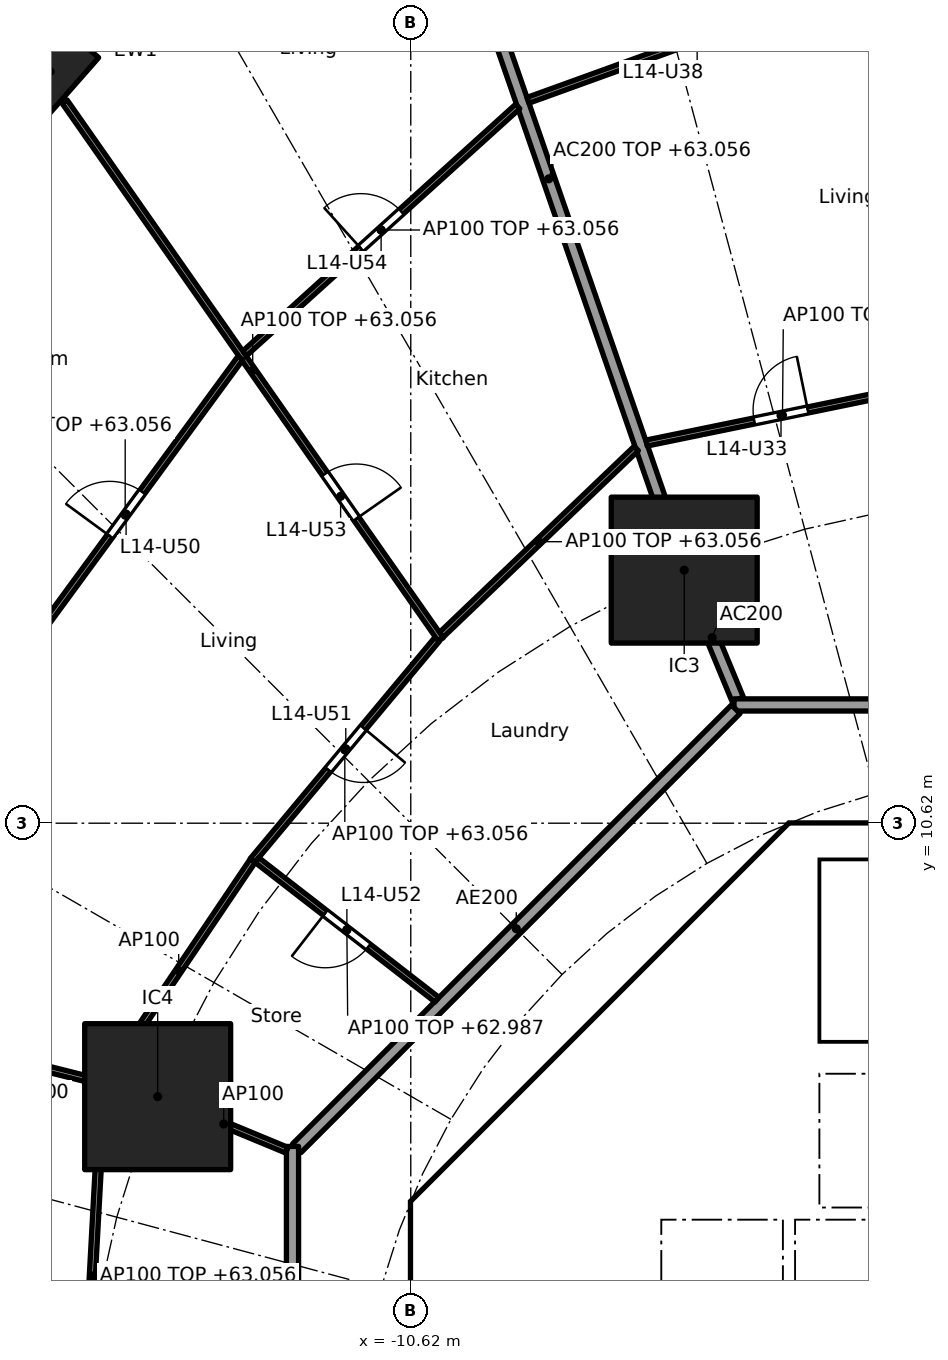
"""IFC4 building model, lengths in metres.
Left out: names, types, materials, properties, quantities, classifications, styles, units other than length and angle.
Written with IfcOpenShell. Run it as: python <this file> out.ifc"""

import sys

from ifc_helpers import new_model, si_unit, direction, frame, frame_2d, origin, origin_2d, place, context, subcontext, project, spatial, polyline, rectangle, hollow_rectangle, outline, extrude, element, fill, save


model = new_model("IFC4")
c1 = context("Model", 3, precision=1e-05, world=origin(), true_north=direction((0.0, 1.0)))
c2 = subcontext(c1, "Body", "Model", "MODEL_VIEW")
j1 = project(units=[si_unit("LENGTHUNIT", "METRE"), si_unit("PLANEANGLEUNIT", "RADIAN")], contexts=[c1])
p1 = place(None, origin())
s1 = spatial("IfcSite", under=j1, at=p1, CompositionType="ELEMENT")
p2 = place(p1, origin())
s2 = spatial("IfcBuilding", under=s1, at=p2, CompositionType="ELEMENT")
p3 = place(p2, frame((0.0, 0.0, 60.3)))
s3 = spatial("IfcBuildingStorey", under=s2, at=p3, CompositionType="ELEMENT", Elevation=60.3)
p4 = place(p3, frame((-16.552, 22.981, 0.0), z_axis=(0.0, 0.0, 1.0), x_axis=(-0.660114607735, -0.751164898445, 0.0)))
e1 = element("IfcColumn", 1, at=p4, inside=s3, PredefinedType="COLUMN", context=c2, shape_type="SweptSolid", body=[
    extrude(hollow_rectangle(XDim=1.4, YDim=0.9, WallThickness=0.05, at=origin_2d()), origin(), (0.0, 0.0, 1.0), 3.7),
])
for number, where, z_axis, x_axis in (
    (2, (-6.123, 14.782, 0.0), (0.0, 0.0, 1.0), (1.0, 0.0, 0.0)),
    (3, (-14.782, 6.123, 0.0), (0.0, 0.0, 1.0), (1.0, 0.0, 0.0)),
):
    element("IfcColumn", number, at=place(p3, frame(where, z_axis=z_axis, x_axis=x_axis)), inside=s3, PredefinedType="COLUMN", context=c2, shape_type="SweptSolid", body=[
        extrude(rectangle(XDim=2.4, YDim=2.4, at=origin_2d()), origin(), (0.0, 0.0, 1.0), 3.7),
    ])
p5 = place(p3, frame((-4.613, 9.988, 0.0), z_axis=(0.0, 0.0, 1.0), x_axis=(-0.707106781187, -0.707106781187, 0.0)))
e4 = element("IfcWall", 4, at=p5, inside=s3, PredefinedType="SHEAR", context=c2, shape_type="SweptSolid", body=[
    extrude(rectangle(XDim=7.602, YDim=0.6, at=frame_2d((3.801, 0.0))), origin(), (0.0, 0.0, 1.0), 3.44),
])
p6 = place(p5, frame((0.351, 0.0, 0.0)))
e5 = element("IfcOpeningElement", 5, at=p6, cuts=e4, PredefinedType="OPENING", context=c2, shape_type="SweptSolid", body=[
    extrude(rectangle(XDim=1.1, YDim=2.1, at=frame_2d((0.55, 1.05))), frame((0.0, 0.31, 0.0), z_axis=(0.0, -1.0, 0.0), x_axis=(1.0, 0.0, 0.0)), (0.0, 0.0, 1.0), 0.62),
])
p7 = place(p3, frame((-10.325, 3.801, 0.0), z_axis=(0.0, 0.0, 1.0), x_axis=(0.0, -1.0, 0.0)))
e6 = element("IfcWall", 6, at=p7, inside=s3, PredefinedType="SHEAR", context=c2, shape_type="SweptSolid", body=[
    extrude(rectangle(XDim=7.602, YDim=0.6, at=frame_2d((3.801, 0.0))), origin(), (0.0, 0.0, 1.0), 3.44),
])
p8 = place(p7, frame((0.651, 0.0, 0.0)))
e7 = element("IfcOpeningElement", 7, at=p8, cuts=e6, PredefinedType="OPENING", context=c2, shape_type="SweptSolid", body=[
    extrude(rectangle(XDim=1.5, YDim=2.1, at=frame_2d((0.75, 1.05))), frame((0.0, 0.31, 0.0), z_axis=(0.0, -1.0, 0.0), x_axis=(1.0, 0.0, 0.0)), (0.0, 0.0, 1.0), 0.62),
])
p9 = place(p7, frame((5.451, 0.0, 0.0)))
e8 = element("IfcOpeningElement", 8, at=p9, cuts=e6, PredefinedType="OPENING", context=c2, shape_type="SweptSolid", body=[
    extrude(rectangle(XDim=1.5, YDim=2.1, at=frame_2d((0.75, 1.05))), frame((0.0, 0.31, 0.0), z_axis=(0.0, -1.0, 0.0), x_axis=(1.0, 0.0, 0.0)), (0.0, 0.0, 1.0), 0.62),
])
p10 = place(p3, frame((-5.8, 4.3, 0.0), z_axis=(0.0, 0.0, 1.0), x_axis=(0.0, 1.0, 0.0)))
e9 = element("IfcWall", 9, at=p10, inside=s3, PredefinedType="PARTITIONING", context=c2, shape_type="SweptSolid", body=[
    extrude(rectangle(XDim=3.927, YDim=0.15, at=frame_2d((1.963, 0.0))), origin(), (0.0, 0.0, 1.0), 3.44),
])
p11 = place(p10, frame((0.413, 0.0, 0.0)))
e10 = element("IfcOpeningElement", 10, at=p11, cuts=e9, PredefinedType="OPENING", context=c2, shape_type="SweptSolid", body=[
    extrude(rectangle(XDim=0.9, YDim=2.1, at=frame_2d((0.45, 1.05))), frame((0.0, 0.085, 0.0), z_axis=(0.0, -1.0, 0.0), x_axis=(1.0, 0.0, 0.0)), (0.0, 0.0, 1.0), 0.17),
])
p12 = place(p10, frame((2.489, 0.0, 0.0)))
e11 = element("IfcOpeningElement", 11, at=p12, cuts=e9, PredefinedType="OPENING", context=c2, shape_type="SweptSolid", body=[
    extrude(rectangle(XDim=0.9, YDim=2.1, at=frame_2d((0.45, 1.05))), frame((0.0, 0.085, 0.0), z_axis=(0.0, -1.0, 0.0), x_axis=(1.0, 0.0, 0.0)), (0.0, 0.0, 1.0), 0.17),
])
p13 = place(p3, frame((-4.0, 4.3, 0.0), z_axis=(0.0, 0.0, 1.0), x_axis=(0.0, 1.0, 0.0)))
e12 = element("IfcWall", 12, at=p13, inside=s3, PredefinedType="SOLIDWALL", context=c2, shape_type="SweptSolid", body=[
    extrude(rectangle(XDim=2.2, YDim=0.2, at=frame_2d((1.1, 0.0))), origin(), (0.0, 0.0, 1.0), 3.44),
])
p14 = place(p13, frame((0.55, 0.0, 0.0)))
e13 = element("IfcOpeningElement", 13, at=p14, cuts=e12, PredefinedType="OPENING", context=c2, shape_type="SweptSolid", body=[
    extrude(rectangle(XDim=1.1, YDim=2.1, at=frame_2d((0.55, 1.05))), frame((0.0, 0.11, 0.0), z_axis=(0.0, -1.0, 0.0), x_axis=(1.0, 0.0, 0.0)), (0.0, 0.0, 1.0), 0.22),
])
p15 = place(p3, origin())
e14 = element("IfcWall", 14, at=p15, inside=s3, PredefinedType="SHEAR", context=c2, shape_type="SweptSolid", body=[
    extrude(outline(polyline([(-10.2, 4.825), (-9.776, 4.401), (-10.025, 4.152), (-10.025, 3.801), (-10.625, 3.801), (-10.625, 4.401), (-10.2, 4.825)])), origin(), (0.0, 0.0, 1.0), 3.44),
])
p16 = place(p3, origin())
e15 = element("IfcWall", 15, at=p16, inside=s3, PredefinedType="SHEAR", context=c2, shape_type="SweptSolid", body=[
    extrude(outline(polyline([(-4.152, 10.025), (-4.401, 9.776), (-4.825, 10.2), (-4.401, 10.625), (4.401, 10.625), (4.825, 10.2), (4.401, 9.776), (4.152, 10.025), (-4.152, 10.025)])), origin(), (0.0, 0.0, 1.0), 3.44),
])
p17 = place(p3, frame((-10.025, 4.0, 0.0), z_axis=(0.0, 0.0, 1.0), x_axis=(1.0, 0.0, 0.0)))
e16 = element("IfcWall", 16, at=p17, inside=s3, PredefinedType="PARTITIONING", context=c2, shape_type="SweptSolid", body=[
    extrude(rectangle(XDim=3.325, YDim=0.2, at=frame_2d((1.662, 0.0))), origin(), (0.0, 0.0, 1.0), 3.44),
])
p18 = place(p3, frame((-8.001, 6.1, 0.0), z_axis=(0.0, 0.0, 1.0), x_axis=(1.0, 0.0, 0.0)))
e17 = element("IfcWall", 17, at=p18, inside=s3, PredefinedType="PARTITIONING", context=c2, shape_type="SweptSolid", body=[
    extrude(rectangle(XDim=2.126, YDim=0.15, at=frame_2d((1.063, 0.0))), origin(), (0.0, 0.0, 1.0), 3.44),
])
p19 = place(p3, origin())
e18 = element("IfcWall", 18, at=p19, inside=s3, PredefinedType="SOLIDWALL", context=c2, shape_type="SweptSolid", body=[
    extrude(outline(polyline([(-6.5, 2.1), (-6.7, 2.1), (-6.7, 4.3), (6.7, 4.3), (6.7, 2.1), (6.5, 2.1), (6.5, 4.1), (4.5, 4.1), (4.5, 2.1), (4.3, 2.1), (4.3, 4.1), (2.3, 4.1), (2.3, 2.1), (2.1, 2.1), (2.1, 4.1), (0.1, 4.1), (0.1, 2.1), (-0.1, 2.1), (-0.1, 4.1), (-2.1, 4.1), (-2.1, 2.1), (-2.3, 2.1), (-2.3, 4.1), (-4.3, 4.1), (-4.3, 2.1), (-4.5, 2.1), (-4.5, 4.1), (-6.5, 4.1), (-6.5, 2.1)])), origin(), (0.0, 0.0, 1.0), 3.44),
])
p20 = place(p3, origin())
e19 = element("IfcWall", 19, at=p20, inside=s3, PredefinedType="SOLIDWALL", context=c2, shape_type="SweptSolid", body=[
    extrude(outline(polyline([(-3.9, 7.025), (-4.1, 7.025), (-4.1, 10.025), (-3.9, 10.025), (-3.9, 7.025)])), origin(), (0.0, 0.0, 1.0), 3.44),
])
p21 = place(p3, origin())
e20 = element("IfcWall", 20, at=p21, inside=s3, PredefinedType="SOLIDWALL", context=c2, shape_type="SweptSolid", body=[
    extrude(outline(polyline([(4.1, 6.5), (-4.1, 6.5), (-4.1, 7.025), (4.1, 7.025), (4.1, 6.5)])), origin(), (0.0, 0.0, 1.0), 3.44),
])
p22 = place(p3, frame((-5.243, 12.657, 0.0), z_axis=(0.0, 0.0, 1.0), x_axis=(-0.382668627144, 0.923885664896, 0.0)))
e21 = element("IfcWall", 21, at=p22, inside=s3, PredefinedType="PARTITIONING", context=c2, shape_type="SweptSolid", body=[
    extrude(rectangle(XDim=2.2, YDim=0.2, at=frame_2d((1.1, 0.0))), origin(), (0.0, 0.0, 1.0), 3.44),
])
p23 = place(p3, frame((-6.139, 14.829, 0.0), z_axis=(0.0, 0.0, 1.0), x_axis=(-0.327178799566, 0.944962450637, 0.0)))
e22 = element("IfcWall", 22, at=p23, inside=s3, PredefinedType="PARTITIONING", context=c2, shape_type="SweptSolid", body=[
    extrude(rectangle(XDim=13.517, YDim=0.2, at=frame_2d((6.759, 0.0))), origin(), (0.0, 0.0, 1.0), 2.756),
])
p24 = place(p3, frame((5.104, 12.565, 0.0), z_axis=(0.0, 0.0, 1.0), x_axis=(-1.0, 0.0, 0.0)))
e23 = element("IfcWall", 23, at=p24, inside=s3, PredefinedType="PARTITIONING", context=c2, shape_type="SweptSolid", body=[
    extrude(rectangle(XDim=10.409, YDim=0.2, at=frame_2d((5.205, 0.0))), origin(), (0.0, 0.0, 1.0), 3.44),
])
p25 = place(p24, frame((1.185, 0.0, 0.0)))
e24 = element("IfcOpeningElement", 24, at=p25, cuts=e23, PredefinedType="OPENING", context=c2, shape_type="SweptSolid", body=[
    extrude(rectangle(XDim=1.0, YDim=2.1, at=frame_2d((0.5, 1.05))), frame((0.0, 0.11, 0.0), z_axis=(0.0, -1.0, 0.0), x_axis=(1.0, 0.0, 0.0)), (0.0, 0.0, 1.0), 0.22),
])
p26 = place(p3, frame((-5.275, 12.494, 0.0), z_axis=(0.0, 0.0, 1.0), x_axis=(-0.707106781187, -0.707106781187, 0.0)))
e25 = element("IfcWall", 25, at=p26, inside=s3, PredefinedType="PARTITIONING", context=c2, shape_type="SweptSolid", body=[
    extrude(rectangle(XDim=10.209, YDim=0.2, at=frame_2d((5.104, 0.0))), origin(), (0.0, 0.0, 1.0), 3.44),
])
p27 = place(p3, frame((-12.565, 5.304, 0.0), z_axis=(0.0, 0.0, 1.0), x_axis=(0.0, -1.0, 0.0)))
e26 = element("IfcWall", 26, at=p27, inside=s3, PredefinedType="PARTITIONING", context=c2, shape_type="SweptSolid", body=[
    extrude(rectangle(XDim=10.409, YDim=0.2, at=frame_2d((5.205, 0.0))), origin(), (0.0, 0.0, 1.0), 3.44),
])
p28 = place(p27, frame((6.106, 0.0, 0.0)))
e27 = element("IfcOpeningElement", 27, at=p28, cuts=e26, PredefinedType="OPENING", context=c2, shape_type="SweptSolid", body=[
    extrude(rectangle(XDim=1.0, YDim=2.1, at=frame_2d((0.5, 1.05))), frame((0.0, 0.11, 0.0), z_axis=(0.0, -1.0, 0.0), x_axis=(1.0, 0.0, 0.0)), (0.0, 0.0, 1.0), 0.22),
])
p29 = place(p3, frame((-2.272, 17.789, 0.0), z_axis=(0.0, 0.0, 1.0), x_axis=(-0.979595137747, -0.200981009307, 0.0)))
e28 = element("IfcWall", 28, at=p29, inside=s3, PredefinedType="PARTITIONING", context=c2, shape_type="SweptSolid", body=[
    extrude(rectangle(XDim=4.562, YDim=0.1, at=frame_2d((2.281, 0.0))), origin(), (0.0, 0.0, 1.0), 2.756),
])
p30 = place(p29, frame((1.856, 0.0, 0.0)))
e29 = element("IfcOpeningElement", 29, at=p30, cuts=e28, PredefinedType="OPENING", context=c2, shape_type="SweptSolid", body=[
    extrude(rectangle(XDim=0.9, YDim=2.1, at=frame_2d((0.45, 1.05))), frame((0.0, 0.06, 0.0), z_axis=(0.0, -1.0, 0.0), x_axis=(1.0, 0.0, 0.0)), (0.0, 0.0, 1.0), 0.12),
])
p31 = place(p3, frame((-3.128, 24.521, 0.0), z_axis=(0.0, 0.0, 1.0), x_axis=(-0.940401494588, -0.340066212636, 0.0)))
e30 = element("IfcWall", 30, at=p31, inside=s3, PredefinedType="PARTITIONING", context=c2, shape_type="SweptSolid", body=[
    extrude(rectangle(XDim=5.917, YDim=0.1, at=frame_2d((2.958, 0.0))), origin(), (0.0, 0.0, 1.0), 2.756),
])
p32 = place(p31, frame((2.509, 0.0, 0.0)))
e31 = element("IfcOpeningElement", 31, at=p32, cuts=e30, PredefinedType="OPENING", context=c2, shape_type="SweptSolid", body=[
    extrude(rectangle(XDim=0.9, YDim=2.1, at=frame_2d((0.45, 1.05))), frame((0.0, 0.06, 0.0), z_axis=(0.0, -1.0, 0.0), x_axis=(1.0, 0.0, 0.0)), (0.0, 0.0, 1.0), 0.12),
])
p33 = place(p3, frame((-6.912, 16.782, 0.0), z_axis=(0.0, 0.0, 1.0), x_axis=(-0.722775679202, -0.691082713975, 0.0)))
e32 = element("IfcWall", 32, at=p33, inside=s3, PredefinedType="PARTITIONING", context=c2, shape_type="SweptSolid", body=[
    extrude(rectangle(XDim=4.437, YDim=0.1, at=frame_2d((2.219, 0.0))), origin(), (0.0, 0.0, 1.0), 2.756),
])
p34 = place(p3, frame((-8.861, 22.407, 0.0), z_axis=(0.0, 0.0, 1.0), x_axis=(-0.741713303551, -0.670717060567, 0.0)))
e33 = element("IfcWall", 33, at=p34, inside=s3, PredefinedType="PARTITIONING", context=c2, shape_type="SweptSolid", body=[
    extrude(rectangle(XDim=6.059, YDim=0.1, at=frame_2d((3.03, 0.0))), origin(), (0.0, 0.0, 1.0), 2.756),
])
p35 = place(p34, frame((2.58, 0.0, 0.0)))
e34 = element("IfcOpeningElement", 34, at=p35, cuts=e33, PredefinedType="OPENING", context=c2, shape_type="SweptSolid", body=[
    extrude(rectangle(XDim=0.9, YDim=2.1, at=frame_2d((0.45, 1.05))), frame((0.0, 0.06, 0.0), z_axis=(0.0, -1.0, 0.0), x_axis=(1.0, 0.0, 0.0)), (0.0, 0.0, 1.0), 0.12),
])
p36 = place(p3, frame((-10.126, 13.641, 0.0), z_axis=(0.0, 0.0, 1.0), x_axis=(-0.57313289907, 0.819462433552, 0.0)))
e35 = element("IfcWall", 35, at=p36, inside=s3, PredefinedType="PARTITIONING", context=c2, shape_type="SweptSolid", body=[
    extrude(rectangle(XDim=10.794, YDim=0.1, at=frame_2d((5.397, 0.0))), origin(), (0.0, 0.0, 1.0), 2.756),
])
p37 = place(p36, frame((2.424, 0.0, 0.0)))
e36 = element("IfcOpeningElement", 36, at=p37, cuts=e35, PredefinedType="OPENING", context=c2, shape_type="SweptSolid", body=[
    extrude(rectangle(XDim=0.9, YDim=2.1, at=frame_2d((0.45, 1.05))), frame((0.0, 0.06, 0.0), z_axis=(0.0, -1.0, 0.0), x_axis=(1.0, 0.0, 0.0)), (0.0, 0.0, 1.0), 0.12),
])
p38 = place(p3, frame((-10.187, 13.643, 0.0), z_axis=(0.0, 0.0, 1.0), x_axis=(-0.640807748916, -0.767701393075, 0.0)))
e37 = element("IfcWall", 37, at=p38, inside=s3, PredefinedType="PARTITIONING", context=c2, shape_type="SweptSolid", body=[
    extrude(rectangle(XDim=4.737, YDim=0.1, at=frame_2d((2.368, 0.0))), origin(), (0.0, 0.0, 1.0), 2.756),
])
p39 = place(p38, frame((1.893, 0.0, 0.0)))
e38 = element("IfcOpeningElement", 38, at=p39, cuts=e37, PredefinedType="OPENING", context=c2, shape_type="SweptSolid", body=[
    extrude(rectangle(XDim=0.9, YDim=2.1, at=frame_2d((0.45, 1.05))), frame((0.0, 0.06, 0.0), z_axis=(0.0, -1.0, 0.0), x_axis=(1.0, 0.0, 0.0)), (0.0, 0.0, 1.0), 0.12),
])
p40 = place(p3, frame((-13.421, 18.269, 0.0), z_axis=(0.0, 0.0, 1.0), x_axis=(-0.591206785834, -0.806520016109, 0.0)))
e39 = element("IfcWall", 39, at=p40, inside=s3, PredefinedType="PARTITIONING", context=c2, shape_type="SweptSolid", body=[
    extrude(rectangle(XDim=6.41, YDim=0.1, at=frame_2d((3.205, 0.0))), origin(), (0.0, 0.0, 1.0), 2.756),
])
p41 = place(p40, frame((2.73, 0.0, 0.0)))
e40 = element("IfcOpeningElement", 40, at=p41, cuts=e39, PredefinedType="OPENING", context=c2, shape_type="SweptSolid", body=[
    extrude(rectangle(XDim=0.9, YDim=2.1, at=frame_2d((0.45, 1.05))), frame((0.0, 0.06, 0.0), z_axis=(0.0, -1.0, 0.0), x_axis=(1.0, 0.0, 0.0)), (0.0, 0.0, 1.0), 0.12),
])
p42 = place(p3, frame((-10.19, 7.719, 0.0), z_axis=(0.0, 0.0, 1.0), x_axis=(-0.790253294643, 0.612780327937, 0.0)))
e41 = element("IfcWall", 41, at=p42, inside=s3, PredefinedType="PARTITIONING", context=c2, shape_type="SweptSolid", body=[
    extrude(rectangle(XDim=3.746, YDim=0.1, at=frame_2d((1.873, 0.0))), origin(), (0.0, 0.0, 1.0), 2.687),
])
p43 = place(p42, frame((1.423, 0.0, 0.0)))
e42 = element("IfcOpeningElement", 42, at=p43, cuts=e41, PredefinedType="OPENING", context=c2, shape_type="SweptSolid", body=[
    extrude(rectangle(XDim=0.9, YDim=2.1, at=frame_2d((0.45, 1.05))), frame((0.0, 0.06, 0.0), z_axis=(0.0, -1.0, 0.0), x_axis=(1.0, 0.0, 0.0)), (0.0, 0.0, 1.0), 0.12),
])
p44 = place(p3, frame((-13.218, 10.004, 0.0), z_axis=(0.0, 0.0, 1.0), x_axis=(-0.559126445155, -0.82908239538, 0.0)))
e43 = element("IfcWall", 43, at=p44, inside=s3, PredefinedType="PARTITIONING", context=c2, shape_type="SweptSolid", body=[
    extrude(rectangle(XDim=4.358, YDim=0.1, at=frame_2d((2.179, 0.0))), origin(), (0.0, 0.0, 1.0), 3.44),
])
p45 = place(p3, frame((-12.657, 5.243, 0.0), z_axis=(0.0, 0.0, 1.0), x_axis=(-0.923864733477, 0.382719158442, 0.0)))
e44 = element("IfcWall", 44, at=p45, inside=s3, PredefinedType="PARTITIONING", context=c2, shape_type="SweptSolid", body=[
    extrude(rectangle(XDim=2.25, YDim=0.1, at=frame_2d((1.125, 0.0))), origin(), (0.0, 0.0, 1.0), 3.44),
])
p46 = place(p3, frame((-14.831, 6.135, 0.0), z_axis=(0.0, 0.0, 1.0), x_axis=(-0.96988230015, 0.243574062362, 0.0)))
e45 = element("IfcWall", 45, at=p46, inside=s3, PredefinedType="PARTITIONING", context=c2, shape_type="SweptSolid", body=[
    extrude(rectangle(XDim=5.144, YDim=0.1, at=frame_2d((2.572, 0.0))), origin(), (0.0, 0.0, 1.0), 3.44),
])
p47 = place(p46, frame((2.561, 0.0, 0.0)))
e46 = element("IfcOpeningElement", 46, at=p47, cuts=e45, PredefinedType="OPENING", context=c2, shape_type="SweptSolid", body=[
    extrude(rectangle(XDim=0.9, YDim=2.1, at=frame_2d((0.45, 1.05))), frame((0.0, 0.06, 0.0), z_axis=(0.0, -1.0, 0.0), x_axis=(1.0, 0.0, 0.0)), (0.0, 0.0, 1.0), 0.12),
])
p48 = place(p3, frame((-15.686, 6.299, 0.0), z_axis=(0.0, 0.0, 1.0), x_axis=(-0.054651178503, -0.99850550759, 0.0)))
e47 = element("IfcWall", 47, at=p48, inside=s3, PredefinedType="PARTITIONING", context=c2, shape_type="SweptSolid", body=[
    extrude(rectangle(XDim=6.259, YDim=0.1, at=frame_2d((3.129, 0.0))), origin(), (0.0, 0.0, 1.0), 2.756),
])
p49 = place(p14, origin())
e48 = element("IfcDoor", 48, at=p49, inside=s3, OperationType="DOUBLE_DOOR_SLIDING", PredefinedType="DOOR", context=c2, shape_type="SweptSolid", body=[
    extrude(rectangle(XDim=1.1, YDim=2.1, at=frame_2d((0.55, 1.05))), frame((0.0, 0.025, 0.0), z_axis=(0.0, -1.0, 0.0), x_axis=(1.0, 0.0, 0.0)), (0.0, 0.0, 1.0), 0.05),
])
fill(e13, e48)
p50 = place(p11, origin())
e49 = element("IfcDoor", 49, at=p50, inside=s3, OperationType="SINGLE_SWING_RIGHT", PredefinedType="DOOR", context=c2, shape_type="SweptSolid", body=[
    extrude(rectangle(XDim=0.9, YDim=2.1, at=frame_2d((0.45, 1.05))), frame((0.0, 0.025, 0.0), z_axis=(0.0, -1.0, 0.0), x_axis=(1.0, 0.0, 0.0)), (0.0, 0.0, 1.0), 0.05),
])
fill(e10, e49)
p51 = place(p12, origin())
e50 = element("IfcDoor", 50, at=p51, inside=s3, OperationType="SINGLE_SWING_RIGHT", PredefinedType="DOOR", context=c2, shape_type="SweptSolid", body=[
    extrude(rectangle(XDim=0.9, YDim=2.1, at=frame_2d((0.45, 1.05))), frame((0.0, 0.025, 0.0), z_axis=(0.0, -1.0, 0.0), x_axis=(1.0, 0.0, 0.0)), (0.0, 0.0, 1.0), 0.05),
])
fill(e11, e50)
p52 = place(p8, origin())
e51 = element("IfcDoor", 51, at=p52, inside=s3, OperationType="DOUBLE_DOOR_SINGLE_SWING", PredefinedType="DOOR", context=c2, shape_type="SweptSolid", body=[
    extrude(rectangle(XDim=1.5, YDim=2.1, at=frame_2d((0.75, 1.05))), frame((0.0, 0.025, 0.0), z_axis=(0.0, -1.0, 0.0), x_axis=(1.0, 0.0, 0.0)), (0.0, 0.0, 1.0), 0.05),
])
fill(e7, e51)
p53 = place(p6, origin())
e52 = element("IfcDoor", 52, at=p53, inside=s3, OperationType="SINGLE_SWING_RIGHT", PredefinedType="DOOR", context=c2, shape_type="SweptSolid", body=[
    extrude(rectangle(XDim=1.1, YDim=2.1, at=frame_2d((0.55, 1.05))), frame((0.0, 0.025, 0.0), z_axis=(0.0, -1.0, 0.0), x_axis=(1.0, 0.0, 0.0)), (0.0, 0.0, 1.0), 0.05),
])
fill(e5, e52)
p54 = place(p30, frame((0.9, 0.0, 0.0), x_axis=(-1.0, 0.0, 0.0)))
e53 = element("IfcDoor", 53, at=p54, inside=s3, OperationType="SINGLE_SWING_RIGHT", PredefinedType="DOOR", context=c2, shape_type="SweptSolid", body=[
    extrude(rectangle(XDim=0.9, YDim=2.1, at=frame_2d((0.45, 1.05))), frame((0.0, 0.025, 0.0), z_axis=(0.0, -1.0, 0.0), x_axis=(1.0, 0.0, 0.0)), (0.0, 0.0, 1.0), 0.05),
])
fill(e29, e53)
p55 = place(p41, frame((0.9, 0.0, 0.0), x_axis=(-1.0, 0.0, 0.0)))
e54 = element("IfcDoor", 54, at=p55, inside=s3, OperationType="SINGLE_SWING_LEFT", PredefinedType="DOOR", context=c2, shape_type="SweptSolid", body=[
    extrude(rectangle(XDim=0.9, YDim=2.1, at=frame_2d((0.45, 1.05))), frame((0.0, 0.025, 0.0), z_axis=(0.0, -1.0, 0.0), x_axis=(1.0, 0.0, 0.0)), (0.0, 0.0, 1.0), 0.05),
])
fill(e40, e54)
p56 = place(p39, origin())
e55 = element("IfcDoor", 55, at=p56, inside=s3, OperationType="SINGLE_SWING_LEFT", PredefinedType="DOOR", context=c2, shape_type="SweptSolid", body=[
    extrude(rectangle(XDim=0.9, YDim=2.1, at=frame_2d((0.45, 1.05))), frame((0.0, 0.025, 0.0), z_axis=(0.0, -1.0, 0.0), x_axis=(1.0, 0.0, 0.0)), (0.0, 0.0, 1.0), 0.05),
])
fill(e38, e55)
p57 = place(p43, origin())
e56 = element("IfcDoor", 56, at=p57, inside=s3, OperationType="SINGLE_SWING_RIGHT", PredefinedType="DOOR", context=c2, shape_type="SweptSolid", body=[
    extrude(rectangle(XDim=0.9, YDim=2.1, at=frame_2d((0.45, 1.05))), frame((0.0, 0.025, 0.0), z_axis=(0.0, -1.0, 0.0), x_axis=(1.0, 0.0, 0.0)), (0.0, 0.0, 1.0), 0.05),
])
fill(e42, e56)
p58 = place(p37, frame((0.9, 0.0, 0.0), x_axis=(-1.0, 0.0, 0.0)))
e57 = element("IfcDoor", 57, at=p58, inside=s3, OperationType="SINGLE_SWING_RIGHT", PredefinedType="DOOR", context=c2, shape_type="SweptSolid", body=[
    extrude(rectangle(XDim=0.9, YDim=2.1, at=frame_2d((0.45, 1.05))), frame((0.0, 0.025, 0.0), z_axis=(0.0, -1.0, 0.0), x_axis=(1.0, 0.0, 0.0)), (0.0, 0.0, 1.0), 0.05),
])
fill(e36, e57)
p59 = place(p35, frame((0.9, 0.0, 0.0), x_axis=(-1.0, 0.0, 0.0)))
e58 = element("IfcDoor", 58, at=p59, inside=s3, OperationType="SINGLE_SWING_LEFT", PredefinedType="DOOR", context=c2, shape_type="SweptSolid", body=[
    extrude(rectangle(XDim=0.9, YDim=2.1, at=frame_2d((0.45, 1.05))), frame((0.0, 0.025, 0.0), z_axis=(0.0, -1.0, 0.0), x_axis=(1.0, 0.0, 0.0)), (0.0, 0.0, 1.0), 0.05),
])
fill(e34, e58)
save(model, sys.argv[1])
